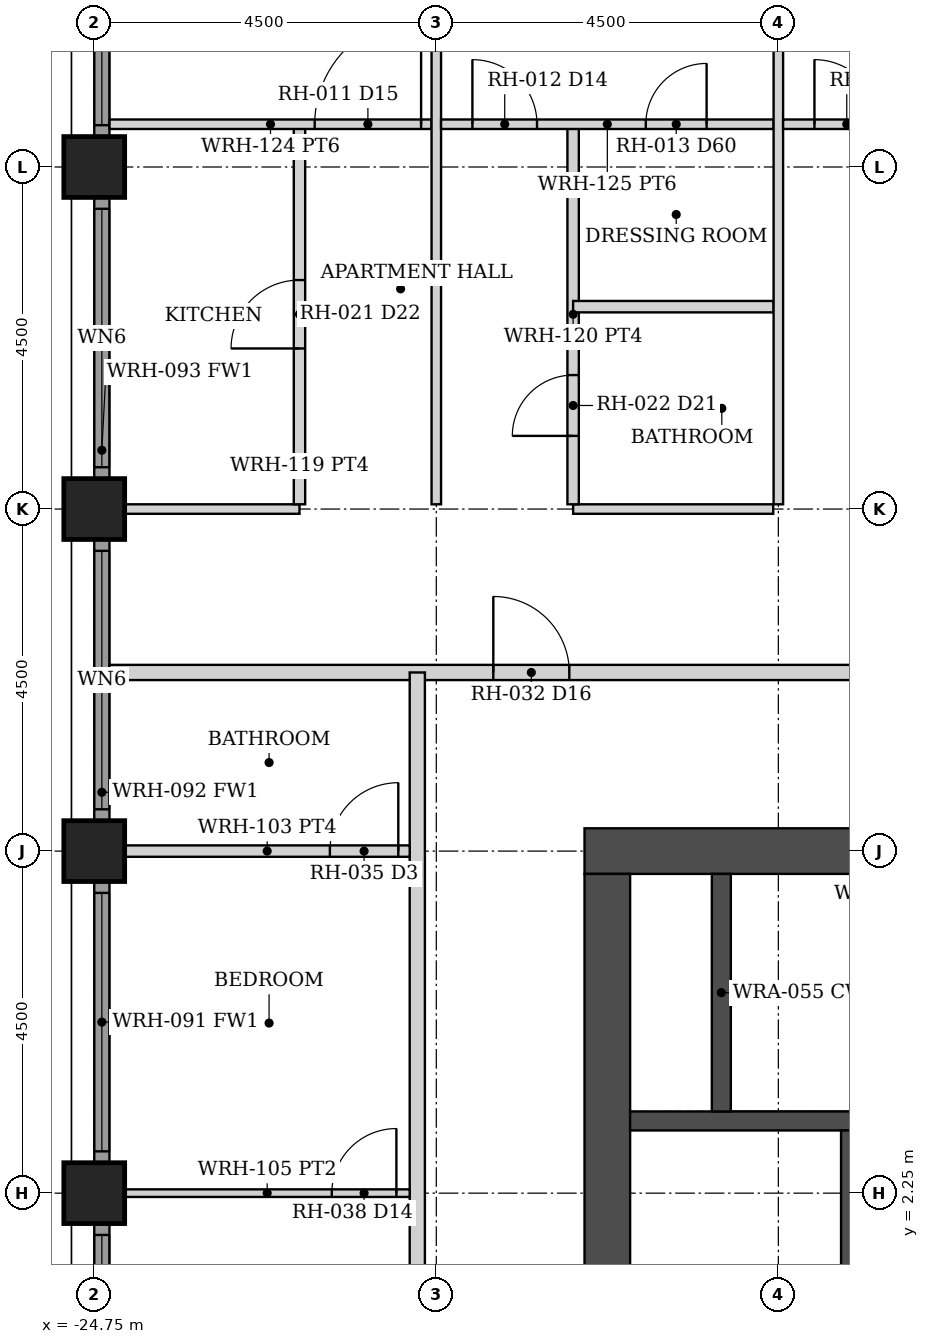
"""IFC4 building model, lengths in metres.
Left out: names, types, materials, properties, quantities, classifications, styles, units other than length and angle.
Written with IfcOpenShell. Run it as: python <this file> out.ifc"""

import sys

from ifc_helpers import new_model, si_unit, direction, frame, frame_2d, origin, origin_2d, place, context, subcontext, project, spatial, rectangle, hollow_rectangle, extrude, element, fill, save


model = new_model("IFC4")
c1 = context("Model", 3, precision=1e-05, world=origin(), true_north=direction((0.0, 1.0)))
c2 = subcontext(c1, "Body", "Model", "MODEL_VIEW")
j1 = project(units=[si_unit("LENGTHUNIT", "METRE"), si_unit("PLANEANGLEUNIT", "RADIAN")], contexts=[c1])
p1 = place(None, origin())
s1 = spatial("IfcSite", under=j1, at=p1, CompositionType="ELEMENT")
p2 = place(p1, origin())
s2 = spatial("IfcBuilding", under=s1, at=p2, CompositionType="ELEMENT")
p3 = place(p2, frame((0.0, 0.0, 103.5)))
s3 = spatial("IfcBuildingStorey", under=s2, at=p3, CompositionType="ELEMENT", Elevation=103.5)
for number, where, z_axis, x_axis in (
    (1, (-24.75, 2.25, 0.0), (0.0, 0.0, 1.0), (1.0, 0.0, 0.0)),
    (2, (-24.75, 6.75, 0.0), (0.0, 0.0, 1.0), (1.0, 0.0, 0.0)),
    (3, (-24.75, 11.25, 0.0), (0.0, 0.0, 1.0), (1.0, 0.0, 0.0)),
    (4, (-24.75, 15.75, 0.0), (0.0, 0.0, 1.0), (1.0, 0.0, 0.0)),
):
    element("IfcColumn", number, at=place(p3, frame(where, z_axis=z_axis, x_axis=x_axis)), inside=s3, PredefinedType="COLUMN", context=c2, shape_type="SweptSolid", body=[
        extrude(hollow_rectangle(XDim=0.8, YDim=0.8, WallThickness=0.06, at=origin_2d()), origin(), (0.0, 0.0, 1.0), 3.5),
    ])
p4 = place(p3, frame((-8.7, 6.75, 0.0), z_axis=(0.0, 0.0, 1.0), x_axis=(-1.0, 0.0, 0.0)))
e5 = element("IfcWall", 5, at=p4, inside=s3, PredefinedType="SHEAR", context=c2, shape_type="SweptSolid", body=[
    extrude(rectangle(XDim=9.6, YDim=0.6, at=frame_2d((4.8, 0.0))), origin(), (0.0, 0.0, 1.0), 3.5),
])
p5 = place(p3, frame((-18.0, -6.45, 0.0), z_axis=(0.0, 0.0, 1.0), x_axis=(0.0, 1.0, 0.0)))
e6 = element("IfcWall", 6, at=p5, inside=s3, PredefinedType="SHEAR", context=c2, shape_type="SweptSolid", body=[
    extrude(rectangle(XDim=12.9, YDim=0.6, at=frame_2d((6.45, 0.0))), origin(), (0.0, 0.0, 1.0), 3.5),
])
p6 = place(p3, frame((-9.3, 3.2, 0.0), z_axis=(0.0, 0.0, 1.0), x_axis=(-1.0, 0.0, 0.0)))
e7 = element("IfcWall", 7, at=p6, inside=s3, PredefinedType="SHEAR", context=c2, shape_type="SweptSolid", body=[
    extrude(rectangle(XDim=8.4, YDim=0.25, at=frame_2d((4.2, 0.0))), origin(), (0.0, 0.0, 1.0), 3.5),
])
p7 = place(p3, frame((-16.5, 3.325, 0.0), z_axis=(0.0, 0.0, 1.0), x_axis=(0.0, 1.0, 0.0)))
e8 = element("IfcWall", 8, at=p7, inside=s3, PredefinedType="SHEAR", context=c2, shape_type="SweptSolid", body=[
    extrude(rectangle(XDim=3.125, YDim=0.25, at=frame_2d((1.562, 0.0))), origin(), (0.0, 0.0, 1.0), 3.5),
])
p8 = place(p3, frame((-14.8, -3.075, 0.0), z_axis=(0.0, 0.0, 1.0), x_axis=(0.0, 1.0, 0.0)))
e9 = element("IfcWall", 9, at=p8, inside=s3, PredefinedType="SHEAR", context=c2, shape_type="SweptSolid", body=[
    extrude(rectangle(XDim=6.15, YDim=0.25, at=frame_2d((3.075, 0.0))), origin(), (0.0, 0.0, 1.0), 3.5),
])
p9 = place(p3, frame((-24.65, -1.845, 0.0), z_axis=(0.0, 0.0, 1.0), x_axis=(0.0, 1.0, 0.0)))
e10 = element("IfcWall", 10, at=p9, inside=s3, PredefinedType="SOLIDWALL", context=c2, shape_type="SweptSolid", body=[
    extrude(rectangle(XDim=3.69, YDim=0.2, at=frame_2d((1.845, 0.0))), origin(), (0.0, 0.0, 1.0), 2.279),
])
p10 = place(p9, frame((0.145, 0.0, 0.3)))
e11 = element("IfcOpeningElement", 11, at=p10, cuts=e10, PredefinedType="OPENING", context=c2, shape_type="SweptSolid", body=[
    extrude(rectangle(XDim=3.4, YDim=1.829, at=frame_2d((1.7, 0.915))), frame((0.0, 0.11, 0.0), z_axis=(0.0, -1.0, 0.0), x_axis=(1.0, 0.0, 0.0)), (0.0, 0.0, 1.0), 0.22),
])
p11 = place(p3, frame((-24.65, 2.655, 0.0), z_axis=(0.0, 0.0, 1.0), x_axis=(0.0, 1.0, 0.0)))
e12 = element("IfcWall", 12, at=p11, inside=s3, PredefinedType="SOLIDWALL", context=c2, shape_type="SweptSolid", body=[
    extrude(rectangle(XDim=3.69, YDim=0.2, at=frame_2d((1.845, 0.0))), origin(), (0.0, 0.0, 1.0), 2.279),
])
p12 = place(p11, frame((0.145, 0.0, 0.3)))
e13 = element("IfcOpeningElement", 13, at=p12, cuts=e12, PredefinedType="OPENING", context=c2, shape_type="SweptSolid", body=[
    extrude(rectangle(XDim=3.4, YDim=1.829, at=frame_2d((1.7, 0.915))), frame((0.0, 0.11, 0.0), z_axis=(0.0, -1.0, 0.0), x_axis=(1.0, 0.0, 0.0)), (0.0, 0.0, 1.0), 0.22),
])
p13 = place(p3, frame((-24.65, 7.155, 0.0), z_axis=(0.0, 0.0, 1.0), x_axis=(0.0, 1.0, 0.0)))
e14 = element("IfcWall", 14, at=p13, inside=s3, PredefinedType="SOLIDWALL", context=c2, shape_type="SweptSolid", body=[
    extrude(rectangle(XDim=3.69, YDim=0.2, at=frame_2d((1.845, 0.0))), origin(), (0.0, 0.0, 1.0), 2.279),
])
p14 = place(p13, frame((0.145, 0.0, 0.3)))
e15 = element("IfcOpeningElement", 15, at=p14, cuts=e14, PredefinedType="OPENING", context=c2, shape_type="SweptSolid", body=[
    extrude(rectangle(XDim=3.4, YDim=1.829, at=frame_2d((1.7, 0.915))), frame((0.0, 0.11, 0.0), z_axis=(0.0, -1.0, 0.0), x_axis=(1.0, 0.0, 0.0)), (0.0, 0.0, 1.0), 0.22),
])
p15 = place(p3, frame((-24.65, 11.655, 0.0), z_axis=(0.0, 0.0, 1.0), x_axis=(0.0, 1.0, 0.0)))
e16 = element("IfcWall", 16, at=p15, inside=s3, PredefinedType="SOLIDWALL", context=c2, shape_type="SweptSolid", body=[
    extrude(rectangle(XDim=3.69, YDim=0.2, at=frame_2d((1.845, 0.0))), origin(), (0.0, 0.0, 1.0), 2.279),
])
p16 = place(p15, frame((0.145, 0.0, 0.3)))
e17 = element("IfcOpeningElement", 17, at=p16, cuts=e16, PredefinedType="OPENING", context=c2, shape_type="SweptSolid", body=[
    extrude(rectangle(XDim=3.4, YDim=1.829, at=frame_2d((1.7, 0.915))), frame((0.0, 0.11, 0.0), z_axis=(0.0, -1.0, 0.0), x_axis=(1.0, 0.0, 0.0)), (0.0, 0.0, 1.0), 0.22),
])
p17 = place(p3, frame((-24.65, 16.155, 0.0), z_axis=(0.0, 0.0, 1.0), x_axis=(0.0, 1.0, 0.0)))
e18 = element("IfcWall", 18, at=p17, inside=s3, PredefinedType="SOLIDWALL", context=c2, shape_type="SweptSolid", body=[
    extrude(rectangle(XDim=3.69, YDim=0.2, at=frame_2d((1.845, 0.0))), origin(), (0.0, 0.0, 1.0), 2.279),
])
p18 = place(p17, frame((0.145, 0.0, 0.3)))
e19 = element("IfcOpeningElement", 19, at=p18, cuts=e18, PredefinedType="OPENING", context=c2, shape_type="SweptSolid", body=[
    extrude(rectangle(XDim=3.4, YDim=1.829, at=frame_2d((1.7, 0.915))), frame((0.0, 0.11, 0.0), z_axis=(0.0, -1.0, 0.0), x_axis=(1.0, 0.0, 0.0)), (0.0, 0.0, 1.0), 0.22),
])
p19 = place(p3, frame((-24.55, 9.1, 0.0), z_axis=(0.0, 0.0, 1.0), x_axis=(1.0, 0.0, 0.0)))
e20 = element("IfcWall", 20, at=p19, inside=s3, PredefinedType="PARTITIONING", context=c2, shape_type="SweptSolid", body=[
    extrude(rectangle(XDim=49.1, YDim=0.2, at=frame_2d((24.55, 0.0))), origin(), (0.0, 0.0, 1.0), 2.279),
])
p20 = place(p19, frame((5.05, 0.0, 0.0)))
e21 = element("IfcOpeningElement", 21, at=p20, cuts=e20, PredefinedType="OPENING", context=c2, shape_type="SweptSolid", body=[
    extrude(rectangle(XDim=1.0, YDim=2.3, at=frame_2d((0.5, 1.15))), frame((0.0, 0.11, 0.0), z_axis=(0.0, -1.0, 0.0), x_axis=(1.0, 0.0, 0.0)), (0.0, 0.0, 1.0), 0.22),
])
p21 = place(p19, frame((22.5, 0.0, 0.0)))
e22 = element("IfcOpeningElement", 22, at=p21, cuts=e20, PredefinedType="OPENING", context=c2, shape_type="SweptSolid", body=[
    extrude(rectangle(XDim=0.9, YDim=2.1, at=frame_2d((0.45, 1.05))), frame((0.0, 0.11, 0.0), z_axis=(0.0, -1.0, 0.0), x_axis=(1.0, 0.0, 0.0)), (0.0, 0.0, 1.0), 0.22),
])
p22 = place(p19, frame((43.05, 0.0, 0.0)))
e23 = element("IfcOpeningElement", 23, at=p22, cuts=e20, PredefinedType="OPENING", context=c2, shape_type="SweptSolid", body=[
    extrude(rectangle(XDim=1.0, YDim=2.3, at=frame_2d((0.5, 1.15))), frame((0.0, 0.11, 0.0), z_axis=(0.0, -1.0, 0.0), x_axis=(1.0, 0.0, 0.0)), (0.0, 0.0, 1.0), 0.22),
])
p23 = place(p3, frame((-20.5, -9.1, 0.0), z_axis=(0.0, 0.0, 1.0), x_axis=(0.0, 1.0, 0.0)))
e24 = element("IfcWall", 24, at=p23, inside=s3, PredefinedType="PARTITIONING", context=c2, shape_type="SweptSolid", body=[
    extrude(rectangle(XDim=18.2, YDim=0.2, at=frame_2d((9.1, 0.0))), origin(), (0.0, 0.0, 1.0), 2.279),
])
p24 = place(p23, frame((6.35, 0.0, 0.0)))
e25 = element("IfcOpeningElement", 25, at=p24, cuts=e24, PredefinedType="OPENING", context=c2, shape_type="SweptSolid", body=[
    extrude(rectangle(XDim=1.0, YDim=2.3, at=frame_2d((0.5, 1.15))), frame((0.0, 0.11, 0.0), z_axis=(0.0, -1.0, 0.0), x_axis=(1.0, 0.0, 0.0)), (0.0, 0.0, 1.0), 0.22),
])
p25 = place(p3, frame((-24.35, 11.25, 0.0), z_axis=(0.0, 0.0, 1.0), x_axis=(1.0, 0.0, 0.0)))
e26 = element("IfcWall", 26, at=p25, inside=s3, PredefinedType="PARTITIONING", context=c2, shape_type="SweptSolid", body=[
    extrude(rectangle(XDim=2.3, YDim=0.125, at=frame_2d((1.15, 0.0))), origin(), (0.0, 0.0, 1.0), 2.279),
])
p26 = place(p3, frame((-22.05, 11.312, 0.0), z_axis=(0.0, 0.0, 1.0), x_axis=(0.0, 1.0, 0.0)))
e27 = element("IfcWall", 27, at=p26, inside=s3, PredefinedType="PARTITIONING", context=c2, shape_type="SweptSolid", body=[
    extrude(rectangle(XDim=5.0, YDim=0.15, at=frame_2d((2.5, 0.0))), origin(), (0.0, 0.0, 1.0), 2.279),
])
p27 = place(p26, frame((2.05, 0.0, 0.0)))
e28 = element("IfcOpeningElement", 28, at=p27, cuts=e27, PredefinedType="OPENING", context=c2, shape_type="SweptSolid", body=[
    extrude(rectangle(XDim=0.9, YDim=2.1, at=frame_2d((0.45, 1.05))), frame((0.0, 0.085, 0.0), z_axis=(0.0, -1.0, 0.0), x_axis=(1.0, 0.0, 0.0)), (0.0, 0.0, 1.0), 0.17),
])
p28 = place(p3, frame((-24.55, 16.312, 0.0), z_axis=(0.0, 0.0, 1.0), x_axis=(1.0, 0.0, 0.0)))
e29 = element("IfcWall", 29, at=p28, inside=s3, PredefinedType="PARTITIONING", context=c2, shape_type="SweptSolid", body=[
    extrude(rectangle(XDim=4.238, YDim=0.125, at=frame_2d((2.119, 0.0))), origin(), (0.0, 0.0, 1.0), 2.279),
])
p29 = place(p28, frame((2.7, 0.0, 0.0)))
e30 = element("IfcOpeningElement", 30, at=p29, cuts=e29, PredefinedType="OPENING", context=c2, shape_type="SweptSolid", body=[
    extrude(rectangle(XDim=1.4, YDim=2.1, at=frame_2d((0.7, 1.05))), frame((0.0, 0.073, 0.0), z_axis=(0.0, -1.0, 0.0), x_axis=(1.0, 0.0, 0.0)), (0.0, 0.0, 1.0), 0.145),
])
p30 = place(p3, frame((-20.25, 11.312, 0.0), z_axis=(0.0, 0.0, 1.0), x_axis=(0.0, 1.0, 0.0)))
e31 = element("IfcWall", 31, at=p30, inside=s3, PredefinedType="PARTITIONING", context=c2, shape_type="SweptSolid", body=[
    extrude(rectangle(XDim=13.038, YDim=0.125, at=frame_2d((6.519, 0.0))), origin(), (0.0, 0.0, 1.0), 2.279),
])
p31 = place(p3, frame((-18.45, 11.25, 0.0), z_axis=(0.0, 0.0, 1.0), x_axis=(1.0, 0.0, 0.0)))
e32 = element("IfcWall", 32, at=p31, inside=s3, PredefinedType="PARTITIONING", context=c2, shape_type="SweptSolid", body=[
    extrude(rectangle(XDim=2.633, YDim=0.125, at=frame_2d((1.316, 0.0))), origin(), (0.0, 0.0, 1.0), 2.279),
])
p32 = place(p3, frame((-18.45, 11.312, 0.0), z_axis=(0.0, 0.0, 1.0), x_axis=(0.0, 1.0, 0.0)))
e33 = element("IfcWall", 33, at=p32, inside=s3, PredefinedType="PARTITIONING", context=c2, shape_type="SweptSolid", body=[
    extrude(rectangle(XDim=5.0, YDim=0.15, at=frame_2d((2.5, 0.0))), origin(), (0.0, 0.0, 1.0), 2.279),
])
p33 = place(p32, frame((0.9, 0.0, 0.0)))
e34 = element("IfcOpeningElement", 34, at=p33, cuts=e33, PredefinedType="OPENING", context=c2, shape_type="SweptSolid", body=[
    extrude(rectangle(XDim=0.8, YDim=2.1, at=frame_2d((0.4, 1.05))), frame((0.0, 0.085, 0.0), z_axis=(0.0, -1.0, 0.0), x_axis=(1.0, 0.0, 0.0)), (0.0, 0.0, 1.0), 0.17),
])
p34 = place(p3, frame((-20.188, 16.312, 0.0), z_axis=(0.0, 0.0, 1.0), x_axis=(1.0, 0.0, 0.0)))
e35 = element("IfcWall", 35, at=p34, inside=s3, PredefinedType="PARTITIONING", context=c2, shape_type="SweptSolid", body=[
    extrude(rectangle(XDim=4.375, YDim=0.125, at=frame_2d((2.188, 0.0))), origin(), (0.0, 0.0, 1.0), 2.279),
])
p35 = place(p34, frame((0.413, 0.0, 0.0)))
e36 = element("IfcOpeningElement", 36, at=p35, cuts=e35, PredefinedType="OPENING", context=c2, shape_type="SweptSolid", body=[
    extrude(rectangle(XDim=0.85, YDim=2.1, at=frame_2d((0.425, 1.05))), frame((0.0, 0.073, 0.0), z_axis=(0.0, -1.0, 0.0), x_axis=(1.0, 0.0, 0.0)), (0.0, 0.0, 1.0), 0.145),
])
p36 = place(p34, frame((2.694, 0.0, 0.0)))
e37 = element("IfcOpeningElement", 37, at=p36, cuts=e35, PredefinedType="OPENING", context=c2, shape_type="SweptSolid", body=[
    extrude(rectangle(XDim=0.8, YDim=2.1, at=frame_2d((0.4, 1.05))), frame((0.0, 0.073, 0.0), z_axis=(0.0, -1.0, 0.0), x_axis=(1.0, 0.0, 0.0)), (0.0, 0.0, 1.0), 0.145),
])
p37 = place(p3, frame((-18.45, 13.913, 0.0), z_axis=(0.0, 0.0, 1.0), x_axis=(1.0, 0.0, 0.0)))
e38 = element("IfcWall", 38, at=p37, inside=s3, PredefinedType="PARTITIONING", context=c2, shape_type="SweptSolid", body=[
    extrude(rectangle(XDim=2.637, YDim=0.15, at=frame_2d((1.319, 0.0))), origin(), (0.0, 0.0, 1.0), 2.279),
])
p38 = place(p3, frame((-15.75, 11.312, 0.0), z_axis=(0.0, 0.0, 1.0), x_axis=(0.0, 1.0, 0.0)))
e39 = element("IfcWall", 39, at=p38, inside=s3, PredefinedType="PARTITIONING", context=c2, shape_type="SweptSolid", body=[
    extrude(rectangle(XDim=13.038, YDim=0.125, at=frame_2d((6.519, 0.0))), origin(), (0.0, 0.0, 1.0), 2.279),
])
p39 = place(p3, frame((-15.688, 16.312, 0.0), z_axis=(0.0, 0.0, 1.0), x_axis=(1.0, 0.0, 0.0)))
e40 = element("IfcWall", 40, at=p39, inside=s3, PredefinedType="PARTITIONING", context=c2, shape_type="SweptSolid", body=[
    extrude(rectangle(XDim=4.375, YDim=0.125, at=frame_2d((2.188, 0.0))), origin(), (0.0, 0.0, 1.0), 2.279),
])
p40 = place(p39, frame((0.413, 0.0, 0.0)))
e41 = element("IfcOpeningElement", 41, at=p40, cuts=e40, PredefinedType="OPENING", context=c2, shape_type="SweptSolid", body=[
    extrude(rectangle(XDim=0.85, YDim=2.1, at=frame_2d((0.425, 1.05))), frame((0.0, 0.073, 0.0), z_axis=(0.0, -1.0, 0.0), x_axis=(1.0, 0.0, 0.0)), (0.0, 0.0, 1.0), 0.145),
])
p41 = place(p39, frame((2.694, 0.0, 0.0)))
e42 = element("IfcOpeningElement", 42, at=p41, cuts=e40, PredefinedType="OPENING", context=c2, shape_type="SweptSolid", body=[
    extrude(rectangle(XDim=0.8, YDim=2.1, at=frame_2d((0.4, 1.05))), frame((0.0, 0.073, 0.0), z_axis=(0.0, -1.0, 0.0), x_axis=(1.0, 0.0, 0.0)), (0.0, 0.0, 1.0), 0.145),
])
p42 = place(p3, frame((-24.35, 2.25, 0.0), z_axis=(0.0, 0.0, 1.0), x_axis=(1.0, 0.0, 0.0)))
e43 = element("IfcWall", 43, at=p42, inside=s3, PredefinedType="PARTITIONING", context=c2, shape_type="SweptSolid", body=[
    extrude(rectangle(XDim=3.75, YDim=0.1, at=frame_2d((1.875, 0.0))), origin(), (0.0, 0.0, 1.0), 2.279),
])
p43 = place(p42, frame((2.725, 0.0, 0.0)))
e44 = element("IfcOpeningElement", 44, at=p43, cuts=e43, PredefinedType="OPENING", context=c2, shape_type="SweptSolid", body=[
    extrude(rectangle(XDim=0.85, YDim=2.1, at=frame_2d((0.425, 1.05))), frame((0.0, 0.06, 0.0), z_axis=(0.0, -1.0, 0.0), x_axis=(1.0, 0.0, 0.0)), (0.0, 0.0, 1.0), 0.12),
])
p44 = place(p3, frame((-24.35, 6.75, 0.0), z_axis=(0.0, 0.0, 1.0), x_axis=(1.0, 0.0, 0.0)))
e45 = element("IfcWall", 45, at=p44, inside=s3, PredefinedType="PARTITIONING", context=c2, shape_type="SweptSolid", body=[
    extrude(rectangle(XDim=3.75, YDim=0.15, at=frame_2d((1.875, 0.0))), origin(), (0.0, 0.0, 1.0), 2.279),
])
p45 = place(p44, frame((2.7, 0.0, 0.0)))
e46 = element("IfcOpeningElement", 46, at=p45, cuts=e45, PredefinedType="OPENING", context=c2, shape_type="SweptSolid", body=[
    extrude(rectangle(XDim=0.9, YDim=2.1, at=frame_2d((0.45, 1.05))), frame((0.0, 0.085, 0.0), z_axis=(0.0, -1.0, 0.0), x_axis=(1.0, 0.0, 0.0)), (0.0, 0.0, 1.0), 0.17),
])
p46 = place(p10, origin())
e47 = element("IfcWindow", 47, at=p46, inside=s3, PartitioningType="SINGLE_PANEL", PredefinedType="WINDOW", context=c2, shape_type="SweptSolid", body=[
    extrude(rectangle(XDim=3.4, YDim=1.829, at=frame_2d((1.7, 0.915))), frame((0.0, 0.03, 0.0), z_axis=(0.0, -1.0, 0.0), x_axis=(1.0, 0.0, 0.0)), (0.0, 0.0, 1.0), 0.06),
])
fill(e11, e47)
p47 = place(p12, origin())
e48 = element("IfcWindow", 48, at=p47, inside=s3, PartitioningType="SINGLE_PANEL", PredefinedType="WINDOW", context=c2, shape_type="SweptSolid", body=[
    extrude(rectangle(XDim=3.4, YDim=1.829, at=frame_2d((1.7, 0.915))), frame((0.0, 0.03, 0.0), z_axis=(0.0, -1.0, 0.0), x_axis=(1.0, 0.0, 0.0)), (0.0, 0.0, 1.0), 0.06),
])
fill(e13, e48)
p48 = place(p14, origin())
e49 = element("IfcWindow", 49, at=p48, inside=s3, PartitioningType="SINGLE_PANEL", PredefinedType="WINDOW", context=c2, shape_type="SweptSolid", body=[
    extrude(rectangle(XDim=3.4, YDim=1.829, at=frame_2d((1.7, 0.915))), frame((0.0, 0.03, 0.0), z_axis=(0.0, -1.0, 0.0), x_axis=(1.0, 0.0, 0.0)), (0.0, 0.0, 1.0), 0.06),
])
fill(e15, e49)
p49 = place(p16, origin())
e50 = element("IfcWindow", 50, at=p49, inside=s3, PartitioningType="SINGLE_PANEL", PredefinedType="WINDOW", context=c2, shape_type="SweptSolid", body=[
    extrude(rectangle(XDim=3.4, YDim=1.829, at=frame_2d((1.7, 0.915))), frame((0.0, 0.03, 0.0), z_axis=(0.0, -1.0, 0.0), x_axis=(1.0, 0.0, 0.0)), (0.0, 0.0, 1.0), 0.06),
])
fill(e17, e50)
p50 = place(p18, origin())
e51 = element("IfcWindow", 51, at=p50, inside=s3, PartitioningType="SINGLE_PANEL", PredefinedType="WINDOW", context=c2, shape_type="SweptSolid", body=[
    extrude(rectangle(XDim=3.4, YDim=1.829, at=frame_2d((1.7, 0.915))), frame((0.0, 0.03, 0.0), z_axis=(0.0, -1.0, 0.0), x_axis=(1.0, 0.0, 0.0)), (0.0, 0.0, 1.0), 0.06),
])
fill(e19, e51)
p51 = place(p20, origin())
e52 = element("IfcDoor", 52, at=p51, inside=s3, OperationType="SINGLE_SWING_LEFT", PredefinedType="DOOR", context=c2, shape_type="SweptSolid", body=[
    extrude(rectangle(XDim=1.0, YDim=2.3, at=frame_2d((0.5, 1.15))), frame((0.0, 0.025, 0.0), z_axis=(0.0, -1.0, 0.0), x_axis=(1.0, 0.0, 0.0)), (0.0, 0.0, 1.0), 0.05),
])
fill(e21, e52)
p52 = place(p27, origin())
e53 = element("IfcDoor", 53, at=p52, inside=s3, OperationType="SINGLE_SWING_LEFT", PredefinedType="DOOR", context=c2, shape_type="SweptSolid", body=[
    extrude(rectangle(XDim=0.9, YDim=2.1, at=frame_2d((0.45, 1.05))), frame((0.0, 0.025, 0.0), z_axis=(0.0, -1.0, 0.0), x_axis=(1.0, 0.0, 0.0)), (0.0, 0.0, 1.0), 0.05),
])
fill(e28, e53)
p53 = place(p29, origin())
e54 = element("IfcDoor", 54, at=p53, inside=s3, OperationType="SINGLE_SWING_RIGHT", PredefinedType="DOOR", context=c2, shape_type="SweptSolid", body=[
    extrude(rectangle(XDim=1.4, YDim=2.1, at=frame_2d((0.7, 1.05))), frame((0.0, 0.025, 0.0), z_axis=(0.0, -1.0, 0.0), x_axis=(1.0, 0.0, 0.0)), (0.0, 0.0, 1.0), 0.05),
])
fill(e30, e54)
p54 = place(p35, origin())
e55 = element("IfcDoor", 55, at=p54, inside=s3, OperationType="SINGLE_SWING_LEFT", PredefinedType="DOOR", context=c2, shape_type="SweptSolid", body=[
    extrude(rectangle(XDim=0.85, YDim=2.1, at=frame_2d((0.425, 1.05))), frame((0.0, 0.025, 0.0), z_axis=(0.0, -1.0, 0.0), x_axis=(1.0, 0.0, 0.0)), (0.0, 0.0, 1.0), 0.05),
])
fill(e36, e55)
p55 = place(p33, origin())
e56 = element("IfcDoor", 56, at=p55, inside=s3, OperationType="SINGLE_SWING_LEFT", PredefinedType="DOOR", context=c2, shape_type="SweptSolid", body=[
    extrude(rectangle(XDim=0.8, YDim=2.1, at=frame_2d((0.4, 1.05))), frame((0.0, 0.025, 0.0), z_axis=(0.0, -1.0, 0.0), x_axis=(1.0, 0.0, 0.0)), (0.0, 0.0, 1.0), 0.05),
])
fill(e34, e56)
p56 = place(p36, origin())
e57 = element("IfcDoor", 57, at=p56, inside=s3, OperationType="SINGLE_SWING_RIGHT", PredefinedType="DOOR", context=c2, shape_type="SweptSolid", body=[
    extrude(rectangle(XDim=0.8, YDim=2.1, at=frame_2d((0.4, 1.05))), frame((0.0, 0.025, 0.0), z_axis=(0.0, -1.0, 0.0), x_axis=(1.0, 0.0, 0.0)), (0.0, 0.0, 1.0), 0.05),
])
fill(e37, e57)
p57 = place(p40, origin())
e58 = element("IfcDoor", 58, at=p57, inside=s3, OperationType="SINGLE_SWING_LEFT", PredefinedType="DOOR", context=c2, shape_type="SweptSolid", body=[
    extrude(rectangle(XDim=0.85, YDim=2.1, at=frame_2d((0.425, 1.05))), frame((0.0, 0.025, 0.0), z_axis=(0.0, -1.0, 0.0), x_axis=(1.0, 0.0, 0.0)), (0.0, 0.0, 1.0), 0.05),
])
fill(e41, e58)
p58 = place(p43, origin())
e59 = element("IfcDoor", 59, at=p58, inside=s3, OperationType="SINGLE_SWING_RIGHT", PredefinedType="DOOR", context=c2, shape_type="SweptSolid", body=[
    extrude(rectangle(XDim=0.85, YDim=2.1, at=frame_2d((0.425, 1.05))), frame((0.0, 0.025, 0.0), z_axis=(0.0, -1.0, 0.0), x_axis=(1.0, 0.0, 0.0)), (0.0, 0.0, 1.0), 0.05),
])
fill(e44, e59)
p59 = place(p45, origin())
e60 = element("IfcDoor", 60, at=p59, inside=s3, OperationType="SINGLE_SWING_RIGHT", PredefinedType="DOOR", context=c2, shape_type="SweptSolid", body=[
    extrude(rectangle(XDim=0.9, YDim=2.1, at=frame_2d((0.45, 1.05))), frame((0.0, 0.025, 0.0), z_axis=(0.0, -1.0, 0.0), x_axis=(1.0, 0.0, 0.0)), (0.0, 0.0, 1.0), 0.05),
])
fill(e46, e60)
save(model, sys.argv[1])
